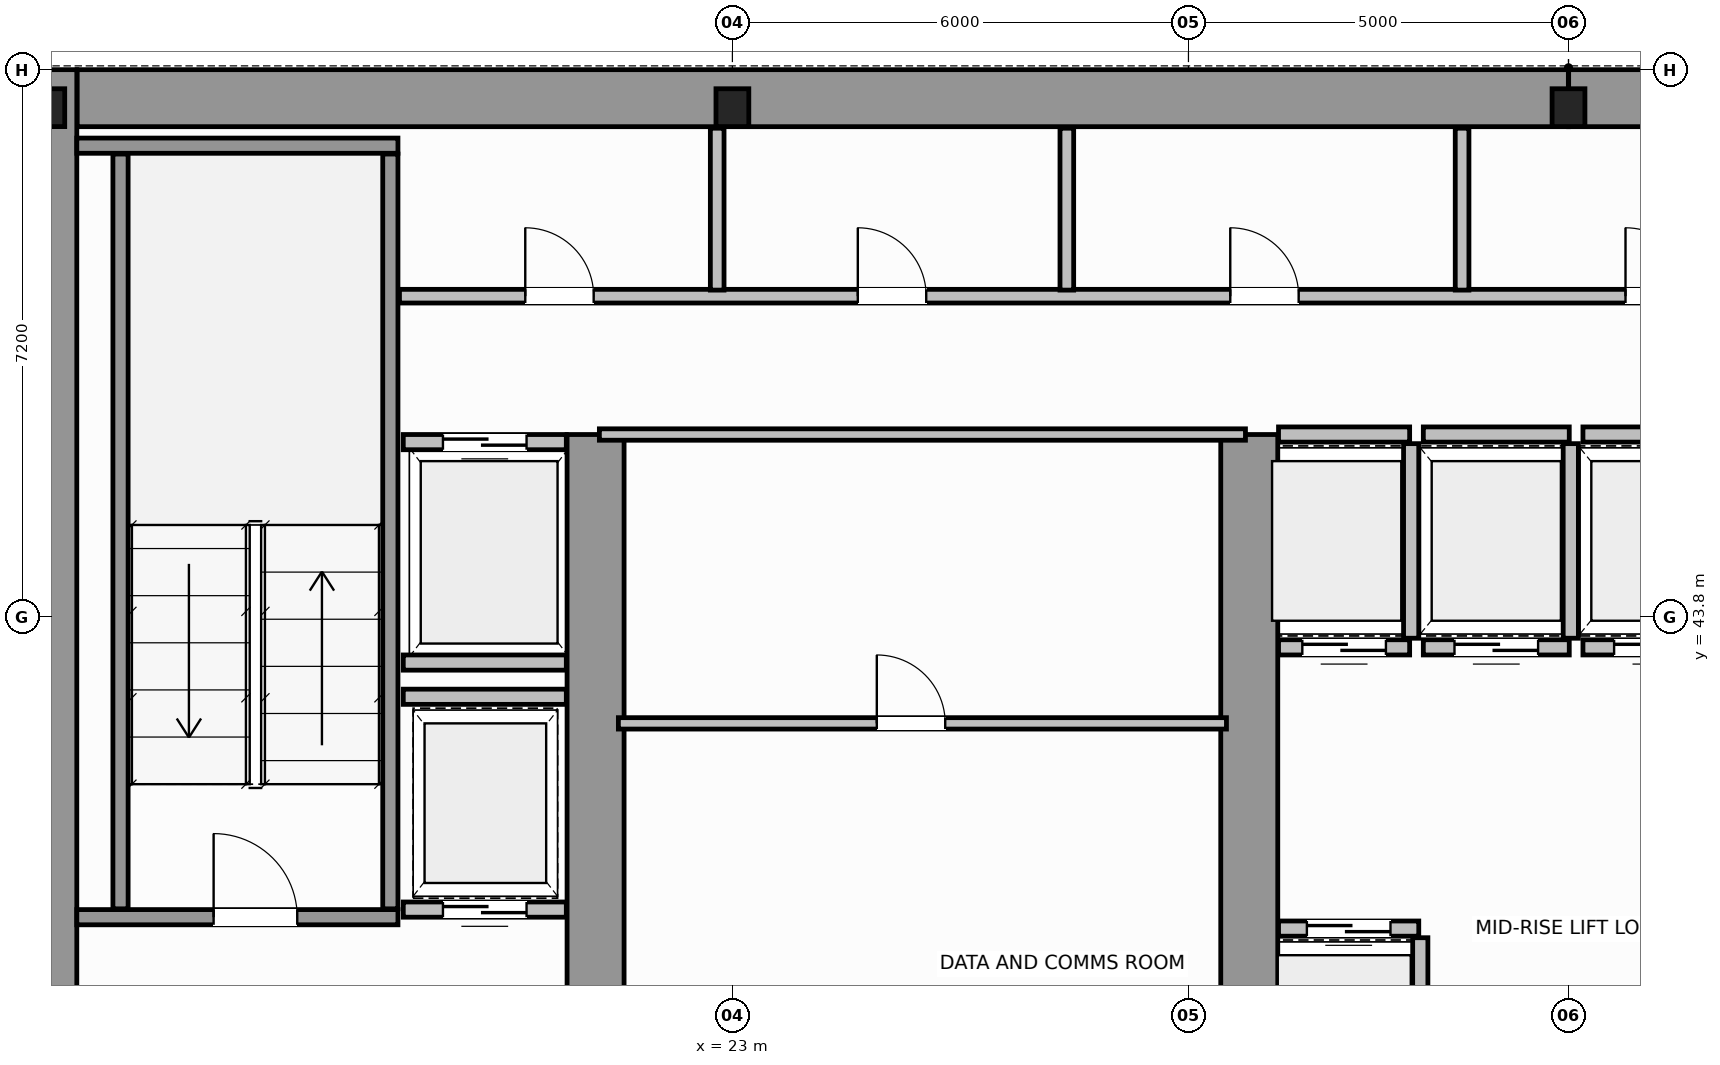
"""IFC4 building model, lengths in metres.
Left out: names, types, materials, properties, quantities, classifications, styles, units other than length and angle.
Written with IfcOpenShell. Run it as: python <this file> out.ifc"""

import sys

from ifc_helpers import new_model, si_unit, direction, frame, frame_2d, origin, origin_2d, place, context, subcontext, project, spatial, rectangle, i_section, extrude, source, transform, mapped, element, fill, save


model = new_model("IFC4")
c1 = context("Model", 3, precision=1e-05, world=origin(), true_north=direction((0.0, 1.0)))
c2 = subcontext(c1, "Body", "Model", "MODEL_VIEW")
j1 = project(units=[si_unit("LENGTHUNIT", "METRE"), si_unit("PLANEANGLEUNIT", "RADIAN")], contexts=[c1])
p1 = place(None, origin())
s1 = spatial("IfcSite", under=j1, at=p1, CompositionType="ELEMENT")
p2 = place(p1, origin())
s2 = spatial("IfcBuilding", under=s1, at=p2, CompositionType="ELEMENT")
p3 = place(p2, frame((0.0, 0.0, 141.4)))
s3 = spatial("IfcBuildingStorey", under=s2, at=p3, CompositionType="ELEMENT", Elevation=141.4)
m1 = source(origin(), c2, "Body", "SweptSolid", [
    extrude(i_section(OverallWidth=0.432, OverallDepth=0.498, WebThickness=0.055, FlangeThickness=0.068, FilletRadius=0.015, at=origin_2d()), origin(), (0.0, 0.0, 1.0), 3.8),
])
for number, where, z_axis, x_axis in (
    (1, (14.0, 50.5, 0.0), (0.0, 0.0, 1.0), (1.0, 0.0, 0.0)),
    (2, (23.0, 50.5, 0.0), (0.0, 0.0, 1.0), (1.0, 0.0, 0.0)),
    (3, (34.0, 50.5, 0.0), (0.0, 0.0, 1.0), (1.0, 0.0, 0.0)),
):
    element("IfcColumn", number, at=place(p3, frame(where, z_axis=z_axis, x_axis=x_axis)), inside=s3, PredefinedType="COLUMN", context=c2, shape_type="MappedRepresentation", body=[
        mapped(m1, transform((0.0, 0.0, 0.0), scale=1.0)),
    ])
for number, where, z_axis, x_axis in (
    (4, (14.379, 50.625, 0.0), (0.0, 0.0, 1.0), (1.0, 0.0, 0.0)),
    (5, (34.002, 50.625, 0.0), (0.0, 0.0, 1.0), (1.0, 0.0, 0.0)),
):
    element("IfcWall", number, at=place(p3, frame(where, z_axis=z_axis, x_axis=x_axis)), inside=s3, PredefinedType="SHEAR", context=c2, shape_type="SweptSolid", body=[
        extrude(rectangle(XDim=19.619, YDim=0.75, at=frame_2d((9.81, 0.0))), origin(), (0.0, 0.0, 1.0), 3.8),
    ])
p4 = place(p3, frame((14.0, 36.5, 0.0), z_axis=(0.0, 0.0, 1.0), x_axis=(0.0, 1.0, 0.0)))
e6 = element("IfcWall", 6, at=p4, inside=s3, PredefinedType="SHEAR", context=c2, shape_type="SweptSolid", body=[
    extrude(rectangle(XDim=14.5, YDim=0.75, at=frame_2d((7.25, 0.0))), origin(), (0.0, 0.0, 1.0), 3.8),
])
for number, where, z_axis, x_axis in (
    (7, (21.2, 36.895, 0.0), (0.0, 0.0, 1.0), (0.0, 1.0, 0.0)),
    (8, (29.8, 36.895, 0.0), (0.0, 0.0, 1.0), (0.0, 1.0, 0.0)),
):
    element("IfcWall", number, at=place(p3, frame(where, z_axis=z_axis, x_axis=x_axis)), inside=s3, PredefinedType="SHEAR", context=c2, shape_type="SweptSolid", body=[
        extrude(rectangle(XDim=9.305, YDim=0.75, at=frame_2d((4.652, 0.0))), origin(), (0.0, 0.0, 1.0), 3.8),
    ])
p5 = place(p3, frame((14.375, 39.85, 0.0), z_axis=(0.0, 0.0, 1.0), x_axis=(1.0, 0.0, 0.0)))
e9 = element("IfcWall", 9, at=p5, inside=s3, PredefinedType="SOLIDWALL", context=c2, shape_type="SweptSolid", body=[
    extrude(rectangle(XDim=4.225, YDim=0.2, at=frame_2d((2.113, 0.0))), origin(), (0.0, 0.0, 1.0), 3.8),
])
p6 = place(p5, frame((1.8, 0.0, 0.0)))
e10 = element("IfcOpeningElement", 10, at=p6, cuts=e9, PredefinedType="OPENING", context=c2, shape_type="SweptSolid", body=[
    extrude(rectangle(XDim=1.1, YDim=2.15, at=frame_2d((0.55, 1.075))), frame((0.0, 0.11, 0.0), z_axis=(0.0, -1.0, 0.0), x_axis=(1.0, 0.0, 0.0)), (0.0, 0.0, 1.0), 0.22),
])
p7 = place(p3, frame((14.375, 50.0, 0.0), z_axis=(0.0, 0.0, 1.0), x_axis=(1.0, 0.0, 0.0)))
e11 = element("IfcWall", 11, at=p7, inside=s3, PredefinedType="SOLIDWALL", context=c2, shape_type="SweptSolid", body=[
    extrude(rectangle(XDim=4.225, YDim=0.2, at=frame_2d((2.113, 0.0))), origin(), (0.0, 0.0, 1.0), 3.8),
])
for number, where, z_axis, x_axis in (
    (12, (14.95, 39.96, 0.0), (0.0, 0.0, 1.0), (0.0, 1.0, 0.0)),
    (13, (18.5, 39.96, 0.0), (0.0, 0.0, 1.0), (0.0, 1.0, 0.0)),
):
    element("IfcWall", number, at=place(p3, frame(where, z_axis=z_axis, x_axis=x_axis)), inside=s3, PredefinedType="SOLIDWALL", context=c2, shape_type="SweptSolid", body=[
        extrude(rectangle(XDim=9.93, YDim=0.2, at=frame_2d((4.965, 0.0))), origin(), (0.0, 0.0, 1.0), 3.8),
    ])
p8 = place(p3, frame((30.185, 39.7, 0.0), z_axis=(0.0, 0.0, 1.0), x_axis=(1.0, 0.0, 0.0)))
e14 = element("IfcWall", 14, at=p8, inside=s3, PredefinedType="SOLIDWALL", context=c2, shape_type="SweptSolid", body=[
    extrude(rectangle(XDim=1.845, YDim=0.2, at=frame_2d((0.922, 0.0))), origin(), (0.0, 0.0, 1.0), 3.58),
])
p9 = place(p8, frame((0.373, 0.0, 0.0)))
e15 = element("IfcOpeningElement", 15, at=p9, cuts=e14, PredefinedType="OPENING", context=c2, shape_type="SweptSolid", body=[
    extrude(rectangle(XDim=1.1, YDim=2.15, at=frame_2d((0.55, 1.075))), frame((0.0, 0.11, 0.0), z_axis=(0.0, -1.0, 0.0), x_axis=(1.0, 0.0, 0.0)), (0.0, 0.0, 1.0), 0.22),
])
p10 = place(p3, frame((32.05, 37.02, 0.0), z_axis=(0.0, 0.0, 1.0), x_axis=(0.0, 1.0, 0.0)))
e16 = element("IfcWall", 16, at=p10, inside=s3, PredefinedType="SOLIDWALL", context=c2, shape_type="SweptSolid", body=[
    extrude(rectangle(XDim=2.56, YDim=0.2, at=frame_2d((1.28, 0.0))), origin(), (0.0, 0.0, 1.0), 3.58),
])
p11 = place(p3, frame((30.185, 43.4, 0.0), z_axis=(0.0, 0.0, 1.0), x_axis=(1.0, 0.0, 0.0)))
e17 = element("IfcWall", 17, at=p11, inside=s3, PredefinedType="SOLIDWALL", context=c2, shape_type="SweptSolid", body=[
    extrude(rectangle(XDim=1.725, YDim=0.2, at=frame_2d((0.862, 0.0))), origin(), (0.0, 0.0, 1.0), 3.58),
])
p12 = place(p11, frame((0.313, 0.0, 0.0)))
e18 = element("IfcOpeningElement", 18, at=p12, cuts=e17, PredefinedType="OPENING", context=c2, shape_type="SweptSolid", body=[
    extrude(rectangle(XDim=1.1, YDim=2.15, at=frame_2d((0.55, 1.075))), frame((0.0, 0.11, 0.0), z_axis=(0.0, -1.0, 0.0), x_axis=(1.0, 0.0, 0.0)), (0.0, 0.0, 1.0), 0.22),
])
p13 = place(p3, frame((30.185, 46.2, 0.0), z_axis=(0.0, 0.0, 1.0), x_axis=(1.0, 0.0, 0.0)))
e19 = element("IfcWall", 19, at=p13, inside=s3, PredefinedType="SOLIDWALL", context=c2, shape_type="SweptSolid", body=[
    extrude(rectangle(XDim=1.725, YDim=0.2, at=frame_2d((0.862, 0.0))), origin(), (0.0, 0.0, 1.0), 3.58),
])
p14 = place(p3, frame((31.93, 43.52, 0.0), z_axis=(0.0, 0.0, 1.0), x_axis=(0.0, 1.0, 0.0)))
e20 = element("IfcWall", 20, at=p14, inside=s3, PredefinedType="SOLIDWALL", context=c2, shape_type="SweptSolid", body=[
    extrude(rectangle(XDim=2.56, YDim=0.2, at=frame_2d((1.28, 0.0))), origin(), (0.0, 0.0, 1.0), 3.58),
])
p15 = place(p3, frame((32.09, 43.4, 0.0), z_axis=(0.0, 0.0, 1.0), x_axis=(1.0, 0.0, 0.0)))
e21 = element("IfcWall", 21, at=p15, inside=s3, PredefinedType="SOLIDWALL", context=c2, shape_type="SweptSolid", body=[
    extrude(rectangle(XDim=1.92, YDim=0.2, at=frame_2d((0.96, 0.0))), origin(), (0.0, 0.0, 1.0), 3.58),
])
p16 = place(p15, frame((0.41, 0.0, 0.0)))
e22 = element("IfcOpeningElement", 22, at=p16, cuts=e21, PredefinedType="OPENING", context=c2, shape_type="SweptSolid", body=[
    extrude(rectangle(XDim=1.1, YDim=2.15, at=frame_2d((0.55, 1.075))), frame((0.0, 0.11, 0.0), z_axis=(0.0, -1.0, 0.0), x_axis=(1.0, 0.0, 0.0)), (0.0, 0.0, 1.0), 0.22),
])
p17 = place(p3, frame((32.09, 46.2, 0.0), z_axis=(0.0, 0.0, 1.0), x_axis=(1.0, 0.0, 0.0)))
e23 = element("IfcWall", 23, at=p17, inside=s3, PredefinedType="SOLIDWALL", context=c2, shape_type="SweptSolid", body=[
    extrude(rectangle(XDim=1.92, YDim=0.2, at=frame_2d((0.96, 0.0))), origin(), (0.0, 0.0, 1.0), 3.58),
])
p18 = place(p3, frame((34.03, 43.52, 0.0), z_axis=(0.0, 0.0, 1.0), x_axis=(0.0, 1.0, 0.0)))
e24 = element("IfcWall", 24, at=p18, inside=s3, PredefinedType="SOLIDWALL", context=c2, shape_type="SweptSolid", body=[
    extrude(rectangle(XDim=2.56, YDim=0.2, at=frame_2d((1.28, 0.0))), origin(), (0.0, 0.0, 1.0), 3.58),
])
p19 = place(p3, frame((34.19, 43.4, 0.0), z_axis=(0.0, 0.0, 1.0), x_axis=(1.0, 0.0, 0.0)))
e25 = element("IfcWall", 25, at=p19, inside=s3, PredefinedType="SOLIDWALL", context=c2, shape_type="SweptSolid", body=[
    extrude(rectangle(XDim=1.92, YDim=0.2, at=frame_2d((0.96, 0.0))), origin(), (0.0, 0.0, 1.0), 3.58),
])
p20 = place(p19, frame((0.41, 0.0, 0.0)))
e26 = element("IfcOpeningElement", 26, at=p20, cuts=e25, PredefinedType="OPENING", context=c2, shape_type="SweptSolid", body=[
    extrude(rectangle(XDim=1.1, YDim=2.15, at=frame_2d((0.55, 1.075))), frame((0.0, 0.11, 0.0), z_axis=(0.0, -1.0, 0.0), x_axis=(1.0, 0.0, 0.0)), (0.0, 0.0, 1.0), 0.22),
])
p21 = place(p3, frame((34.19, 46.2, 0.0), z_axis=(0.0, 0.0, 1.0), x_axis=(1.0, 0.0, 0.0)))
e27 = element("IfcWall", 27, at=p21, inside=s3, PredefinedType="SOLIDWALL", context=c2, shape_type="SweptSolid", body=[
    extrude(rectangle(XDim=1.92, YDim=0.2, at=frame_2d((0.96, 0.0))), origin(), (0.0, 0.0, 1.0), 3.58),
])
p22 = place(p3, frame((18.67, 46.1, 0.0), z_axis=(0.0, 0.0, 1.0), x_axis=(1.0, 0.0, 0.0)))
e28 = element("IfcWall", 28, at=p22, inside=s3, PredefinedType="SOLIDWALL", context=c2, shape_type="SweptSolid", body=[
    extrude(rectangle(XDim=2.145, YDim=0.2, at=frame_2d((1.073, 0.0))), origin(), (0.0, 0.0, 1.0), 3.58),
])
p23 = place(p22, frame((0.522, 0.0, 0.0)))
e29 = element("IfcOpeningElement", 29, at=p23, cuts=e28, PredefinedType="OPENING", context=c2, shape_type="SweptSolid", body=[
    extrude(rectangle(XDim=1.1, YDim=2.15, at=frame_2d((0.55, 1.075))), frame((0.0, 0.11, 0.0), z_axis=(0.0, -1.0, 0.0), x_axis=(1.0, 0.0, 0.0)), (0.0, 0.0, 1.0), 0.22),
])
p24 = place(p3, frame((18.67, 43.2, 0.0), z_axis=(0.0, 0.0, 1.0), x_axis=(1.0, 0.0, 0.0)))
e30 = element("IfcWall", 30, at=p24, inside=s3, PredefinedType="SOLIDWALL", context=c2, shape_type="SweptSolid", body=[
    extrude(rectangle(XDim=2.145, YDim=0.2, at=frame_2d((1.073, 0.0))), origin(), (0.0, 0.0, 1.0), 3.58),
])
p25 = place(p3, frame((18.67, 39.95, 0.0), z_axis=(0.0, 0.0, 1.0), x_axis=(1.0, 0.0, 0.0)))
e31 = element("IfcWall", 31, at=p25, inside=s3, PredefinedType="SOLIDWALL", context=c2, shape_type="SweptSolid", body=[
    extrude(rectangle(XDim=2.145, YDim=0.2, at=frame_2d((1.073, 0.0))), origin(), (0.0, 0.0, 1.0), 3.58),
])
p26 = place(p25, frame((0.522, 0.0, 0.0)))
e32 = element("IfcOpeningElement", 32, at=p26, cuts=e31, PredefinedType="OPENING", context=c2, shape_type="SweptSolid", body=[
    extrude(rectangle(XDim=1.1, YDim=2.15, at=frame_2d((0.55, 1.075))), frame((0.0, 0.11, 0.0), z_axis=(0.0, -1.0, 0.0), x_axis=(1.0, 0.0, 0.0)), (0.0, 0.0, 1.0), 0.22),
])
p27 = place(p3, frame((18.67, 42.75, 0.0), z_axis=(0.0, 0.0, 1.0), x_axis=(1.0, 0.0, 0.0)))
e33 = element("IfcWall", 33, at=p27, inside=s3, PredefinedType="SOLIDWALL", context=c2, shape_type="SweptSolid", body=[
    extrude(rectangle(XDim=2.145, YDim=0.2, at=frame_2d((1.073, 0.0))), origin(), (0.0, 0.0, 1.0), 3.58),
])
p28 = place(p3, frame((21.25, 46.2, 0.0), z_axis=(0.0, 0.0, 1.0), x_axis=(1.0, 0.0, 0.0)))
e34 = element("IfcWall", 34, at=p28, inside=s3, PredefinedType="PARTITIONING", context=c2, shape_type="SweptSolid", body=[
    extrude(rectangle(XDim=8.5, YDim=0.15, at=frame_2d((4.25, 0.0))), origin(), (0.0, 0.0, 1.0), 3.58),
])
p29 = place(p3, frame((21.5, 42.4, 0.0), z_axis=(0.0, 0.0, 1.0), x_axis=(1.0, 0.0, 0.0)))
e35 = element("IfcWall", 35, at=p29, inside=s3, PredefinedType="PARTITIONING", context=c2, shape_type="SweptSolid", body=[
    extrude(rectangle(XDim=8.0, YDim=0.15, at=frame_2d((4.0, 0.0))), origin(), (0.0, 0.0, 1.0), 3.58),
])
p30 = place(p29, frame((3.4, 0.0, 0.0)))
e36 = element("IfcOpeningElement", 36, at=p30, cuts=e35, PredefinedType="OPENING", context=c2, shape_type="SweptSolid", body=[
    extrude(rectangle(XDim=0.9, YDim=2.1, at=frame_2d((0.45, 1.05))), frame((0.0, 0.085, 0.0), z_axis=(0.0, -1.0, 0.0), x_axis=(1.0, 0.0, 0.0)), (0.0, 0.0, 1.0), 0.17),
])
p31 = place(p3, frame((18.62, 48.02, 0.0), z_axis=(0.0, 0.0, 1.0), x_axis=(1.0, 0.0, 0.0)))
e37 = element("IfcWall", 37, at=p31, inside=s3, PredefinedType="PLUMBINGWALL", context=c2, shape_type="SweptSolid", body=[
    extrude(rectangle(XDim=30.76, YDim=0.18, at=frame_2d((15.38, 0.0))), origin(), (0.0, 0.0, 1.0), 3.58),
])
p32 = place(p31, frame((1.655, 0.0, 0.0)))
e38 = element("IfcOpeningElement", 38, at=p32, cuts=e37, PredefinedType="OPENING", context=c2, shape_type="SweptSolid", body=[
    extrude(rectangle(XDim=0.9, YDim=2.15, at=frame_2d((0.45, 1.075))), frame((0.0, 0.1, 0.0), z_axis=(0.0, -1.0, 0.0), x_axis=(1.0, 0.0, 0.0)), (0.0, 0.0, 1.0), 0.2),
])
p33 = place(p31, frame((6.03, 0.0, 0.0)))
e39 = element("IfcOpeningElement", 39, at=p33, cuts=e37, PredefinedType="OPENING", context=c2, shape_type="SweptSolid", body=[
    extrude(rectangle(XDim=0.9, YDim=2.15, at=frame_2d((0.45, 1.075))), frame((0.0, 0.1, 0.0), z_axis=(0.0, -1.0, 0.0), x_axis=(1.0, 0.0, 0.0)), (0.0, 0.0, 1.0), 0.2),
])
p34 = place(p31, frame((10.93, 0.0, 0.0)))
e40 = element("IfcOpeningElement", 40, at=p34, cuts=e37, PredefinedType="OPENING", context=c2, shape_type="SweptSolid", body=[
    extrude(rectangle(XDim=0.9, YDim=2.15, at=frame_2d((0.45, 1.075))), frame((0.0, 0.1, 0.0), z_axis=(0.0, -1.0, 0.0), x_axis=(1.0, 0.0, 0.0)), (0.0, 0.0, 1.0), 0.2),
])
p35 = place(p31, frame((16.13, 0.0, 0.0)))
e41 = element("IfcOpeningElement", 41, at=p35, cuts=e37, PredefinedType="OPENING", context=c2, shape_type="SweptSolid", body=[
    extrude(rectangle(XDim=0.9, YDim=2.15, at=frame_2d((0.45, 1.075))), frame((0.0, 0.1, 0.0), z_axis=(0.0, -1.0, 0.0), x_axis=(1.0, 0.0, 0.0)), (0.0, 0.0, 1.0), 0.2),
])
p36 = place(p31, frame((21.73, 0.0, 0.0)))
e42 = element("IfcOpeningElement", 42, at=p36, cuts=e37, PredefinedType="OPENING", context=c2, shape_type="SweptSolid", body=[
    extrude(rectangle(XDim=0.9, YDim=2.15, at=frame_2d((0.45, 1.075))), frame((0.0, 0.1, 0.0), z_axis=(0.0, -1.0, 0.0), x_axis=(1.0, 0.0, 0.0)), (0.0, 0.0, 1.0), 0.2),
])
p37 = place(p31, frame((27.505, 0.0, 0.0)))
e43 = element("IfcOpeningElement", 43, at=p37, cuts=e37, PredefinedType="OPENING", context=c2, shape_type="SweptSolid", body=[
    extrude(rectangle(XDim=0.9, YDim=2.15, at=frame_2d((0.45, 1.075))), frame((0.0, 0.1, 0.0), z_axis=(0.0, -1.0, 0.0), x_axis=(1.0, 0.0, 0.0)), (0.0, 0.0, 1.0), 0.2),
])
p38 = place(p3, frame((22.8, 48.1, 0.0), z_axis=(0.0, 0.0, 1.0), x_axis=(0.0, 1.0, 0.0)))
e44 = element("IfcWall", 44, at=p38, inside=s3, PredefinedType="PLUMBINGWALL", context=c2, shape_type="SweptSolid", body=[
    extrude(rectangle(XDim=2.13, YDim=0.18, at=frame_2d((1.065, 0.0))), origin(), (0.0, 0.0, 1.0), 2.87),
])
for number, where, z_axis, x_axis in (
    (45, (27.4, 48.1, 0.0), (0.0, 0.0, 1.0), (0.0, 1.0, 0.0)),
    (46, (32.6, 48.1, 0.0), (0.0, 0.0, 1.0), (0.0, 1.0, 0.0)),
):
    element("IfcWall", number, at=place(p3, frame(where, z_axis=z_axis, x_axis=x_axis)), inside=s3, PredefinedType="PLUMBINGWALL", context=c2, shape_type="SweptSolid", body=[
        extrude(rectangle(XDim=2.13, YDim=0.18, at=frame_2d((1.065, 0.0))), origin(), (0.0, 0.0, 1.0), 3.58),
    ])
m2 = source(origin(), c2, "Body", "SweptSolid", [
    extrude(rectangle(XDim=1.1, YDim=2.15, at=frame_2d((0.55, 1.075))), frame((0.0, 0.025, 0.0), z_axis=(0.0, -1.0, 0.0), x_axis=(1.0, 0.0, 0.0)), (0.0, 0.0, 1.0), 0.05),
])
p39 = place(p6, origin())
e47 = element("IfcDoor", 47, at=p39, inside=s3, OperationType="SINGLE_SWING_LEFT", PredefinedType="DOOR", context=c2, shape_type="MappedRepresentation", body=[
    mapped(m2, transform((0.0, 0.0, 0.0), scale=1.0)),
])
fill(e10, e47)
p40 = place(p9, origin())
e48 = element("IfcDoor", 48, at=p40, inside=s3, OperationType="DOUBLE_DOOR_SLIDING", PredefinedType="DOOR", context=c2, shape_type="MappedRepresentation", body=[
    mapped(m2, transform((0.0, 0.0, 0.0), scale=1.0)),
])
fill(e15, e48)
p41 = place(p12, origin())
e49 = element("IfcDoor", 49, at=p41, inside=s3, OperationType="DOUBLE_DOOR_SLIDING", PredefinedType="DOOR", context=c2, shape_type="MappedRepresentation", body=[
    mapped(m2, transform((0.0, 0.0, 0.0), scale=1.0)),
])
fill(e18, e49)
p42 = place(p16, origin())
e50 = element("IfcDoor", 50, at=p42, inside=s3, OperationType="DOUBLE_DOOR_SLIDING", PredefinedType="DOOR", context=c2, shape_type="MappedRepresentation", body=[
    mapped(m2, transform((0.0, 0.0, 0.0), scale=1.0)),
])
fill(e22, e50)
p43 = place(p20, origin())
e51 = element("IfcDoor", 51, at=p43, inside=s3, OperationType="DOUBLE_DOOR_SLIDING", PredefinedType="DOOR", context=c2, shape_type="MappedRepresentation", body=[
    mapped(m2, transform((0.0, 0.0, 0.0), scale=1.0)),
])
fill(e26, e51)
p44 = place(p23, origin())
e52 = element("IfcDoor", 52, at=p44, inside=s3, OperationType="DOUBLE_DOOR_SLIDING", PredefinedType="DOOR", context=c2, shape_type="MappedRepresentation", body=[
    mapped(m2, transform((0.0, 0.0, 0.0), scale=1.0)),
])
fill(e29, e52)
p45 = place(p26, origin())
e53 = element("IfcDoor", 53, at=p45, inside=s3, OperationType="DOUBLE_DOOR_SLIDING", PredefinedType="DOOR", context=c2, shape_type="MappedRepresentation", body=[
    mapped(m2, transform((0.0, 0.0, 0.0), scale=1.0)),
])
fill(e32, e53)
m3 = source(origin(), c2, "Body", "SweptSolid", [
    extrude(rectangle(XDim=0.9, YDim=2.1, at=frame_2d((0.45, 1.05))), frame((0.0, 0.025, 0.0), z_axis=(0.0, -1.0, 0.0), x_axis=(1.0, 0.0, 0.0)), (0.0, 0.0, 1.0), 0.05),
])
p46 = place(p30, origin())
e54 = element("IfcDoor", 54, at=p46, inside=s3, OperationType="SINGLE_SWING_RIGHT", PredefinedType="DOOR", context=c2, shape_type="MappedRepresentation", body=[
    mapped(m3, transform((0.0, 0.0, 0.0), scale=1.0)),
])
fill(e36, e54)
m4 = source(origin(), c2, "Body", "SweptSolid", [
    extrude(rectangle(XDim=0.9, YDim=2.15, at=frame_2d((0.45, 1.075))), frame((0.0, 0.025, 0.0), z_axis=(0.0, -1.0, 0.0), x_axis=(1.0, 0.0, 0.0)), (0.0, 0.0, 1.0), 0.05),
])
p47 = place(p32, origin())
e55 = element("IfcDoor", 55, at=p47, inside=s3, OperationType="SINGLE_SWING_LEFT", PredefinedType="DOOR", context=c2, shape_type="MappedRepresentation", body=[
    mapped(m4, transform((0.0, 0.0, 0.0), scale=1.0)),
])
fill(e38, e55)
p48 = place(p33, origin())
e56 = element("IfcDoor", 56, at=p48, inside=s3, OperationType="SINGLE_SWING_RIGHT", PredefinedType="DOOR", context=c2, shape_type="MappedRepresentation", body=[
    mapped(m4, transform((0.0, 0.0, 0.0), scale=1.0)),
])
fill(e39, e56)
p49 = place(p34, origin())
e57 = element("IfcDoor", 57, at=p49, inside=s3, OperationType="SINGLE_SWING_LEFT", PredefinedType="DOOR", context=c2, shape_type="MappedRepresentation", body=[
    mapped(m4, transform((0.0, 0.0, 0.0), scale=1.0)),
])
fill(e40, e57)
p50 = place(p35, origin())
e58 = element("IfcDoor", 58, at=p50, inside=s3, OperationType="SINGLE_SWING_RIGHT", PredefinedType="DOOR", context=c2, shape_type="MappedRepresentation", body=[
    mapped(m4, transform((0.0, 0.0, 0.0), scale=1.0)),
])
fill(e41, e58)
save(model, sys.argv[1])
